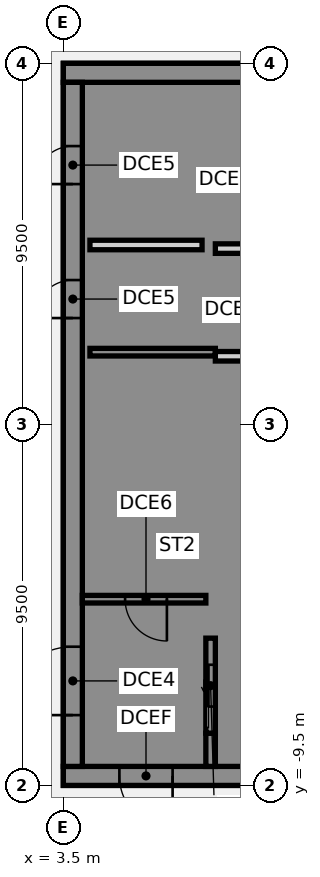
"""IFC4 building model, lengths in metres.
Left out: names, types, materials, properties, quantities, classifications, styles, units other than length and angle.
Written with IfcOpenShell. Run it as: python <this file> out.ifc"""

import sys

from ifc_helpers import new_model, si_unit, direction, frame, frame_2d, origin, place, context, subcontext, project, spatial, polyline, rectangle, outline, extrude, element, fill, save


model = new_model("IFC4")
c1 = context("Model", 3, precision=1e-05, world=origin(), true_north=direction((0.0, 1.0)))
c2 = subcontext(c1, "Body", "Model", "MODEL_VIEW")
j1 = project(units=[si_unit("LENGTHUNIT", "METRE"), si_unit("PLANEANGLEUNIT", "RADIAN")], contexts=[c1])
p1 = place(None, origin())
s1 = spatial("IfcSite", under=j1, at=p1, CompositionType="ELEMENT")
p2 = place(p1, origin())
s2 = spatial("IfcBuilding", under=s1, at=p2, CompositionType="ELEMENT")
p3 = place(p2, frame((0.0, 0.0, 287.4)))
s3 = spatial("IfcBuildingStorey", under=s2, at=p3, CompositionType="ELEMENT", Elevation=287.4)
p4 = place(p3, frame((16.5, -9.25, 0.0), z_axis=(0.0, 0.0, 1.0), x_axis=(-1.0, 0.0, 0.0)))
e1 = element("IfcWall", 1, at=p4, inside=s3, PredefinedType="SHEAR", context=c2, shape_type="SweptSolid", body=[
    extrude(rectangle(XDim=13.0, YDim=0.5, at=frame_2d((6.5, 0.0))), origin(), (0.0, 0.0, 1.0), 6.8),
])
p5 = place(p4, frame((4.15, 0.0, 0.0)))
e2 = element("IfcOpeningElement", 2, at=p5, cuts=e1, PredefinedType="OPENING", context=c2, shape_type="SweptSolid", body=[
    extrude(rectangle(XDim=1.4, YDim=2.1, at=frame_2d((0.7, 1.05))), frame((0.0, 0.26, 0.0), z_axis=(0.0, -1.0, 0.0), x_axis=(1.0, 0.0, 0.0)), (0.0, 0.0, 1.0), 0.52),
])
p6 = place(p4, frame((10.125, 0.0, 0.0)))
e3 = element("IfcOpeningElement", 3, at=p6, cuts=e1, PredefinedType="OPENING", context=c2, shape_type="SweptSolid", body=[
    extrude(rectangle(XDim=1.4, YDim=2.1, at=frame_2d((0.7, 1.05))), frame((0.0, 0.26, 0.0), z_axis=(0.0, -1.0, 0.0), x_axis=(1.0, 0.0, 0.0)), (0.0, 0.0, 1.0), 0.52),
])
p7 = place(p3, frame((16.5, 9.25, 0.0), z_axis=(0.0, 0.0, 1.0), x_axis=(-1.0, 0.0, 0.0)))
e4 = element("IfcWall", 4, at=p7, inside=s3, PredefinedType="SHEAR", context=c2, shape_type="SweptSolid", body=[
    extrude(rectangle(XDim=13.0, YDim=0.5, at=frame_2d((6.5, 0.0))), origin(), (0.0, 0.0, 1.0), 6.8),
])
p8 = place(p7, frame((4.15, 0.0, 0.0)))
e5 = element("IfcOpeningElement", 5, at=p8, cuts=e4, PredefinedType="OPENING", context=c2, shape_type="SweptSolid", body=[
    extrude(rectangle(XDim=1.4, YDim=2.1, at=frame_2d((0.7, 1.05))), frame((0.0, 0.26, 0.0), z_axis=(0.0, -1.0, 0.0), x_axis=(1.0, 0.0, 0.0)), (0.0, 0.0, 1.0), 0.52),
])
p9 = place(p3, origin())
e6 = element("IfcWall", 6, at=p9, inside=s3, PredefinedType="SHEAR", context=c2, shape_type="SweptSolid", body=[
    extrude(outline(polyline([(9.8, -5.625), (9.8, -5.375), (7.5, -5.375), (7.5, 8.125), (9.8, 8.125), (9.8, 9.0), (7.5, 9.0), (7.25, 9.0), (7.25, -5.625), (7.5, -5.625), (9.8, -5.625)])), origin(), (0.0, 0.0, 1.0), 6.8),
])
p10 = place(p3, origin())
e7 = element("IfcWall", 7, at=p10, inside=s3, PredefinedType="SHEAR", context=c2, shape_type="SweptSolid", body=[
    extrude(outline(polyline([(7.5, -8.125), (7.5, -9.0), (9.8, -9.0), (9.8, -8.125), (9.8, -5.625), (9.55, -5.625), (9.55, -8.125), (7.5, -8.125)])), origin(), (0.0, 0.0, 1.0), 6.8),
])
p11 = place(p3, frame((7.375, -9.0, 0.0), z_axis=(0.0, 0.0, 1.0), x_axis=(0.0, 1.0, 0.0)))
e8 = element("IfcWall", 8, at=p11, inside=s3, PredefinedType="SHEAR", context=c2, shape_type="SweptSolid", body=[
    extrude(rectangle(XDim=0.875, YDim=0.25, at=frame_2d((0.438, 0.0))), origin(), (0.0, 0.0, 1.0), 6.8),
])
p12 = place(p3, frame((7.5, 1.9, 0.0), z_axis=(0.0, 0.0, 1.0), x_axis=(-1.0, 0.0, 0.0)))
e9 = element("IfcWall", 9, at=p12, inside=s3, PredefinedType="SHEAR", context=c2, shape_type="SweptSolid", body=[
    extrude(rectangle(XDim=3.3, YDim=0.2, at=frame_2d((1.65, 0.0))), origin(), (0.0, 0.0, 1.0), 6.8),
])
p13 = place(p3, frame((7.375, -8.125, 0.0), z_axis=(0.0, 0.0, 1.0), x_axis=(0.0, 1.0, 0.0)))
e10 = element("IfcWall", 10, at=p13, inside=s3, PredefinedType="SHEAR", context=c2, shape_type="SweptSolid", body=[
    extrude(rectangle(XDim=2.5, YDim=0.25, at=frame_2d((1.25, 0.0))), origin(), (0.0, 0.0, 1.0), 6.8),
])
p14 = place(p13, frame((0.7, 0.0, 0.0)))
e11 = element("IfcOpeningElement", 11, at=p14, cuts=e10, PredefinedType="OPENING", context=c2, shape_type="SweptSolid", body=[
    extrude(rectangle(XDim=1.1, YDim=2.1, at=frame_2d((0.55, 1.05))), frame((0.0, 0.135, 0.0), z_axis=(0.0, -1.0, 0.0), x_axis=(1.0, 0.0, 0.0)), (0.0, 0.0, 1.0), 0.27),
])
p15 = place(p3, frame((3.75, -9.0, 0.0), z_axis=(0.0, 0.0, 1.0), x_axis=(0.0, 1.0, 0.0)))
e12 = element("IfcWall", 12, at=p15, inside=s3, PredefinedType="SHEAR", context=c2, shape_type="SweptSolid", body=[
    extrude(rectangle(XDim=18.0, YDim=0.5, at=frame_2d((9.0, 0.0))), origin(), (0.0, 0.0, 1.0), 6.8),
])
p16 = place(p15, frame((1.35, 0.0, 0.0)))
e13 = element("IfcOpeningElement", 13, at=p16, cuts=e12, PredefinedType="OPENING", context=c2, shape_type="SweptSolid", body=[
    extrude(rectangle(XDim=1.8, YDim=2.1, at=frame_2d((0.9, 1.05))), frame((0.0, 0.26, 0.0), z_axis=(0.0, -1.0, 0.0), x_axis=(1.0, 0.0, 0.0)), (0.0, 0.0, 1.0), 0.52),
])
p17 = place(p15, frame((11.798, 0.0, 0.0)))
e14 = element("IfcOpeningElement", 14, at=p17, cuts=e12, PredefinedType="OPENING", context=c2, shape_type="SweptSolid", body=[
    extrude(rectangle(XDim=1.0, YDim=2.1, at=frame_2d((0.5, 1.05))), frame((0.0, 0.26, 0.0), z_axis=(0.0, -1.0, 0.0), x_axis=(1.0, 0.0, 0.0)), (0.0, 0.0, 1.0), 0.52),
])
p18 = place(p15, frame((15.323, 0.0, 0.0)))
e15 = element("IfcOpeningElement", 15, at=p18, cuts=e12, PredefinedType="OPENING", context=c2, shape_type="SweptSolid", body=[
    extrude(rectangle(XDim=1.0, YDim=2.1, at=frame_2d((0.5, 1.05))), frame((0.0, 0.26, 0.0), z_axis=(0.0, -1.0, 0.0), x_axis=(1.0, 0.0, 0.0)), (0.0, 0.0, 1.0), 0.52),
])
p19 = place(p3, frame((7.15, 4.72, 0.0), z_axis=(0.0, 0.0, 1.0), x_axis=(-1.0, 0.0, 0.0)))
e16 = element("IfcWall", 16, at=p19, inside=s3, PredefinedType="PARTITIONING", context=c2, shape_type="SweptSolid", body=[
    extrude(rectangle(XDim=2.95, YDim=0.25, at=frame_2d((1.475, 0.0))), origin(), (0.0, 0.0, 1.0), 6.8),
])
p20 = place(p3, frame((7.25, -4.6, 0.0), z_axis=(0.0, 0.0, 1.0), x_axis=(-1.0, 0.0, 0.0)))
e17 = element("IfcWall", 17, at=p20, inside=s3, PredefinedType="SHEAR", context=c2, shape_type="SweptSolid", body=[
    extrude(rectangle(XDim=3.25, YDim=0.2, at=frame_2d((1.625, 0.0))), origin(), (0.0, 0.0, 1.0), 6.8),
])
p21 = place(p20, frame((1.025, 0.0, 0.0)))
e18 = element("IfcOpeningElement", 18, at=p21, cuts=e17, PredefinedType="OPENING", context=c2, shape_type="SweptSolid", body=[
    extrude(rectangle(XDim=1.1, YDim=2.1, at=frame_2d((0.55, 1.05))), frame((0.0, 0.11, 0.0), z_axis=(0.0, -1.0, 0.0), x_axis=(1.0, 0.0, 0.0)), (0.0, 0.0, 1.0), 0.22),
])
for number, where, z_axis, x_axis in (
    (19, (9.8, 1.792, 0.0), (0.0, 0.0, 1.0), (-1.0, 0.0, 0.0)),
    (20, (9.8, 4.625, 0.0), (0.0, 0.0, 1.0), (-1.0, 0.0, 0.0)),
):
    element("IfcWall", number, at=place(p3, frame(where, z_axis=z_axis, x_axis=x_axis)), inside=s3, PredefinedType="PARTITIONING", context=c2, shape_type="SweptSolid", body=[
        extrude(rectangle(XDim=2.3, YDim=0.25, at=frame_2d((1.15, 0.0))), origin(), (0.0, 0.0, 1.0), 6.8),
    ])
p22 = place(p6, origin())
e21 = element("IfcDoor", 21, at=p22, inside=s3, OperationType="SINGLE_SWING_LEFT", PredefinedType="DOOR", context=c2, shape_type="SweptSolid", body=[
    extrude(rectangle(XDim=1.4, YDim=2.1, at=frame_2d((0.7, 1.05))), frame((0.0, 0.025, 0.0), z_axis=(0.0, -1.0, 0.0), x_axis=(1.0, 0.0, 0.0)), (0.0, 0.0, 1.0), 0.05),
])
fill(e3, e21)
p23 = place(p16, origin())
e22 = element("IfcDoor", 22, at=p23, inside=s3, OperationType="SINGLE_SWING_LEFT", PredefinedType="DOOR", context=c2, shape_type="SweptSolid", body=[
    extrude(rectangle(XDim=1.8, YDim=2.1, at=frame_2d((0.9, 1.05))), frame((0.0, 0.025, 0.0), z_axis=(0.0, -1.0, 0.0), x_axis=(1.0, 0.0, 0.0)), (0.0, 0.0, 1.0), 0.05),
])
fill(e13, e22)
p24 = place(p17, origin())
e23 = element("IfcDoor", 23, at=p24, inside=s3, OperationType="SINGLE_SWING_LEFT", PredefinedType="DOOR", context=c2, shape_type="SweptSolid", body=[
    extrude(rectangle(XDim=1.0, YDim=2.1, at=frame_2d((0.5, 1.05))), frame((0.0, -0.175, 0.0), z_axis=(0.0, -1.0, 0.0), x_axis=(1.0, 0.0, 0.0)), (0.0, 0.0, 1.0), 0.05),
])
fill(e14, e23)
p25 = place(p18, origin())
e24 = element("IfcDoor", 24, at=p25, inside=s3, OperationType="SINGLE_SWING_LEFT", PredefinedType="DOOR", context=c2, shape_type="SweptSolid", body=[
    extrude(rectangle(XDim=1.0, YDim=2.1, at=frame_2d((0.5, 1.05))), frame((0.0, -0.175, 0.0), z_axis=(0.0, -1.0, 0.0), x_axis=(1.0, 0.0, 0.0)), (0.0, 0.0, 1.0), 0.05),
])
fill(e15, e24)
p26 = place(p21, origin())
e25 = element("IfcDoor", 25, at=p26, inside=s3, OperationType="SINGLE_SWING_LEFT", PredefinedType="DOOR", context=c2, shape_type="SweptSolid", body=[
    extrude(rectangle(XDim=1.1, YDim=2.1, at=frame_2d((0.55, 1.05))), frame((0.0, 0.025, 0.0), z_axis=(0.0, -1.0, 0.0), x_axis=(1.0, 0.0, 0.0)), (0.0, 0.0, 1.0), 0.05),
])
fill(e18, e25)
p27 = place(p14, origin())
e26 = element("IfcDoor", 26, at=p27, inside=s3, OperationType="SLIDING_TO_LEFT", PredefinedType="DOOR", context=c2, shape_type="SweptSolid", body=[
    extrude(rectangle(XDim=1.1, YDim=2.1, at=frame_2d((0.55, 1.05))), frame((0.0, 0.025, 0.0), z_axis=(0.0, -1.0, 0.0), x_axis=(1.0, 0.0, 0.0)), (0.0, 0.0, 1.0), 0.05),
])
fill(e11, e26)
save(model, sys.argv[1])
